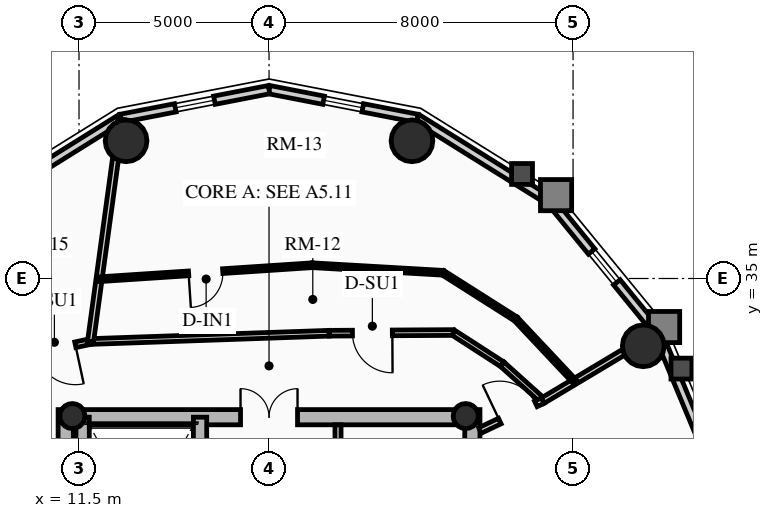
"""IFC4 building model, lengths in metres.
Left out: names, types, materials, properties, quantities, classifications, styles, units other than length and angle.
Written with IfcOpenShell. Run it as: python <this file> out.ifc"""

import sys

from ifc_helpers import new_model, si_unit, direction, frame, frame_2d, origin, origin_2d, place, context, subcontext, project, spatial, rectangle, circle, hollow_circle, extrude, source, transform, mapped, element, fill, save


model = new_model("IFC4")
c1 = context("Model", 3, precision=1e-05, world=origin(), true_north=direction((0.0, 1.0)))
c2 = subcontext(c1, "Body", "Model", "MODEL_VIEW")
j1 = project(units=[si_unit("LENGTHUNIT", "METRE"), si_unit("PLANEANGLEUNIT", "RADIAN")], contexts=[c1])
p1 = place(None, origin())
s1 = spatial("IfcSite", under=j1, at=p1, CompositionType="ELEMENT")
p2 = place(p1, origin())
s2 = spatial("IfcBuilding", under=s1, at=p2, CompositionType="ELEMENT")
p3 = place(p2, frame((0.0, 0.0, 219.94)))
s3 = spatial("IfcBuildingStorey", under=s2, at=p3, CompositionType="ELEMENT", Elevation=219.94)
for number, where, z_axis, x_axis in (
    (1, (11.15, 17.45, 0.0), (0.0, 0.0, 1.0), (0.0, 1.0, 0.0)),
    (2, (21.85, 17.45, 0.0), (0.0, 0.0, 1.0), (0.0, 1.0, 0.0)),
):
    element("IfcWall", number, at=place(p3, frame(where, z_axis=z_axis, x_axis=x_axis)), inside=s3, PredefinedType="SHEAR", context=c2, shape_type="SweptSolid", body=[
        extrude(rectangle(XDim=14.1, YDim=0.4, at=frame_2d((7.05, 0.0))), origin(), (0.0, 0.0, 1.0), 2.91),
    ])
p4 = place(p3, frame((11.15, 31.35, 0.0), z_axis=(0.0, 0.0, 1.0), x_axis=(1.0, 0.0, 0.0)))
e3 = element("IfcWall", 3, at=p4, inside=s3, PredefinedType="SHEAR", context=c2, shape_type="SweptSolid", body=[
    extrude(rectangle(XDim=10.7, YDim=0.4, at=frame_2d((5.35, 0.0))), origin(), (0.0, 0.0, 1.0), 2.91),
])
m1 = source(origin(), c2, "Body", "SweptSolid", [
    extrude(rectangle(XDim=1.5, YDim=2.02, at=frame_2d((0.75, 1.01))), frame((0.0, 0.21, 0.0), z_axis=(0.0, -1.0, 0.0), x_axis=(1.0, 0.0, 0.0)), (0.0, 0.0, 1.0), 0.42),
])
p5 = place(p4, frame((4.6, 0.0, 0.0)))
e4 = element("IfcOpeningElement", 4, at=p5, cuts=e3, PredefinedType="OPENING", context=c2, shape_type="MappedRepresentation", body=[
    mapped(m1, transform((0.0, 0.0, 0.0), x_axis=(1.0, 0.0, 0.0), y_axis=(0.0, 1.0, 0.0), z_axis=(0.0, 0.0, 1.0), scale=1.0)),
])
p6 = place(p3, frame((14.685, 17.65, 0.0), z_axis=(0.0, 0.0, 1.0), x_axis=(0.0, 1.0, 0.0)))
e5 = element("IfcWall", 5, at=p6, inside=s3, PredefinedType="SHEAR", context=c2, shape_type="SweptSolid", body=[
    extrude(rectangle(XDim=13.7, YDim=0.35, at=frame_2d((6.85, 0.0))), origin(), (0.0, 0.0, 1.0), 2.91),
])
m2 = source(origin(), c2, "Body", "SweptSolid", [
    extrude(rectangle(XDim=1.1, YDim=2.015, at=frame_2d((0.55, 1.007))), frame((0.0, 0.185, 0.0), z_axis=(0.0, -1.0, 0.0), x_axis=(1.0, 0.0, 0.0)), (0.0, 0.0, 1.0), 0.37),
])
p7 = place(p6, frame((4.85, 0.0, 0.0)))
e6 = element("IfcOpeningElement", 6, at=p7, cuts=e5, PredefinedType="OPENING", context=c2, shape_type="MappedRepresentation", body=[
    mapped(m2, transform((0.0, 0.0, 0.0), x_axis=(1.0, 0.0, 0.0), y_axis=(0.0, 1.0, 0.0), z_axis=(0.0, 0.0, 1.0), scale=1.0)),
])
p8 = place(p6, frame((0.625, 0.0, 0.0)))
e7 = element("IfcOpeningElement", 7, at=p8, cuts=e5, PredefinedType="OPENING", context=c2, shape_type="MappedRepresentation", body=[
    mapped(m2, transform((0.0, 0.0, 0.0), x_axis=(1.0, 0.0, 0.0), y_axis=(0.0, 1.0, 0.0), z_axis=(0.0, 0.0, 1.0), scale=1.0)),
])
p9 = place(p6, frame((2.625, 0.0, 0.0)))
e8 = element("IfcOpeningElement", 8, at=p9, cuts=e5, PredefinedType="OPENING", context=c2, shape_type="MappedRepresentation", body=[
    mapped(m2, transform((0.0, 0.0, 0.0), x_axis=(1.0, 0.0, 0.0), y_axis=(0.0, 1.0, 0.0), z_axis=(0.0, 0.0, 1.0), scale=1.0)),
])
m3 = source(origin(), c2, "Body", "SweptSolid", [
    extrude(rectangle(XDim=1.15, YDim=2.02, at=frame_2d((0.575, 1.01))), frame((0.0, 0.185, 0.0), z_axis=(0.0, -1.0, 0.0), x_axis=(1.0, 0.0, 0.0)), (0.0, 0.0, 1.0), 0.37),
])
p10 = place(p6, frame((7.27, 0.0, 0.0)))
e9 = element("IfcOpeningElement", 9, at=p10, cuts=e5, PredefinedType="OPENING", context=c2, shape_type="MappedRepresentation", body=[
    mapped(m3, transform((0.0, 0.0, 0.0), x_axis=(1.0, 0.0, 0.0), y_axis=(0.0, 1.0, 0.0), z_axis=(0.0, 0.0, 1.0), scale=1.0)),
])
p11 = place(p3, frame((11.595, 24.655, 0.0), z_axis=(0.0, 0.0, 1.0), x_axis=(0.0, 1.0, 0.0)))
e10 = element("IfcWall", 10, at=p11, inside=s3, PredefinedType="SHEAR", context=c2, shape_type="SweptSolid", body=[
    extrude(rectangle(XDim=6.695, YDim=0.35, at=frame_2d((3.348, 0.0))), origin(), (0.0, 0.0, 1.0), 2.91),
])
for number, where, z_axis, x_axis in (
    (11, (11.325, 31.38, 0.0), (0.0, 0.0, 1.0), (1.0, 0.0, 0.0)),
    (12, (21.675, 31.38, 0.0), (0.0, 0.0, 1.0), (1.0, 0.0, 0.0)),
):
    element("IfcColumn", number, at=place(p3, frame(where, z_axis=z_axis, x_axis=x_axis)), inside=s3, PredefinedType="COLUMN", context=c2, shape_type="SweptSolid", body=[
        extrude(hollow_circle(Radius=0.33, WallThickness=0.025, at=origin_2d()), origin(), (0.0, 0.0, 1.0), 2.91),
    ])
for number, where, z_axis, x_axis in (
    (13, (26.347, 33.229, 0.0), (0.0, 0.0, 1.0), (1.0, 0.0, 0.0)),
    (14, (20.261, 38.623, 0.0), (0.0, 0.0, 1.0), (1.0, 0.0, 0.0)),
    (15, (12.739, 38.623, 0.0), (0.0, 0.0, 1.0), (1.0, 0.0, 0.0)),
):
    element("IfcColumn", number, at=place(p3, frame(where, z_axis=z_axis, x_axis=x_axis)), inside=s3, PredefinedType="USERDEFINED", context=c2, shape_type="SweptSolid", body=[
        extrude(circle(Radius=0.55, at=origin_2d()), origin(), (0.0, 0.0, 1.0), 2.91),
    ])
p12 = place(p3, frame((26.718, 33.593, 0.0), z_axis=(0.0, 0.0, 1.0), x_axis=(0.384036305194, -0.923317993052, 0.0)))
e16 = element("IfcWall", 16, at=p12, inside=s3, PredefinedType="SOLIDWALL", context=c2, shape_type="SweptSolid", body=[
    extrude(rectangle(XDim=4.671, YDim=0.22, at=frame_2d((2.335, 0.0))), origin(), (0.0, 0.0, 1.0), 2.322),
])
p13 = place(p3, frame((23.924, 37.015, 0.0), z_axis=(0.0, 0.0, 1.0), x_axis=(0.632467166636, -0.774587169483, 0.0)))
e17 = element("IfcWall", 17, at=p13, inside=s3, PredefinedType="SOLIDWALL", context=c2, shape_type="SweptSolid", body=[
    extrude(rectangle(XDim=4.418, YDim=0.22, at=frame_2d((2.209, 0.0))), origin(), (0.0, 0.0, 1.0), 2.322),
])
m4 = source(origin(), c2, "Body", "SweptSolid", [
    extrude(rectangle(XDim=1.05, YDim=1.3, at=frame_2d((0.525, 0.65))), frame((0.0, 0.12, 0.0), z_axis=(0.0, -1.0, 0.0), x_axis=(1.0, 0.0, 0.0)), (0.0, 0.0, 1.0), 0.24),
])
p14 = place(p13, frame((1.684, 0.0, 0.65)))
e18 = element("IfcOpeningElement", 18, at=p14, cuts=e17, PredefinedType="OPENING", context=c2, shape_type="MappedRepresentation", body=[
    mapped(m4, transform((0.0, 0.0, 0.0), x_axis=(1.0, 0.0, 0.0), y_axis=(0.0, 1.0, 0.0), z_axis=(0.0, 0.0, 1.0), scale=1.0)),
])
p15 = place(p3, frame((20.403, 39.213, 0.0), z_axis=(0.0, 0.0, 1.0), x_axis=(0.848318713376, -0.529485939886, 0.0)))
e19 = element("IfcWall", 19, at=p15, inside=s3, PredefinedType="SOLIDWALL", context=c2, shape_type="SweptSolid", body=[
    extrude(rectangle(XDim=4.15, YDim=0.22, at=frame_2d((2.075, 0.0))), origin(), (0.0, 0.0, 1.0), 2.322),
])
p16 = place(p3, frame((16.5, 39.97, 0.0), z_axis=(0.0, 0.0, 1.0), x_axis=(0.981700307484, -0.190432419211, 0.0)))
e20 = element("IfcWall", 20, at=p16, inside=s3, PredefinedType="SOLIDWALL", context=c2, shape_type="SweptSolid", body=[
    extrude(rectangle(XDim=3.976, YDim=0.22, at=frame_2d((1.988, 0.0))), origin(), (0.0, 0.0, 1.0), 2.322),
])
p17 = place(p16, frame((1.463, 0.0, 0.65)))
e21 = element("IfcOpeningElement", 21, at=p17, cuts=e20, PredefinedType="OPENING", context=c2, shape_type="MappedRepresentation", body=[
    mapped(m4, transform((0.0, 0.0, 0.0), x_axis=(1.0, 0.0, 0.0), y_axis=(0.0, 1.0, 0.0), z_axis=(0.0, 0.0, 1.0), scale=1.0)),
])
p18 = place(p3, frame((12.597, 39.213, 0.0), z_axis=(0.0, 0.0, 1.0), x_axis=(0.981700307484, 0.190432419211, 0.0)))
e22 = element("IfcWall", 22, at=p18, inside=s3, PredefinedType="SOLIDWALL", context=c2, shape_type="SweptSolid", body=[
    extrude(rectangle(XDim=3.976, YDim=0.22, at=frame_2d((1.988, 0.0))), origin(), (0.0, 0.0, 1.0), 2.322),
])
p19 = place(p18, frame((1.463, 0.0, 0.65)))
e23 = element("IfcOpeningElement", 23, at=p19, cuts=e22, PredefinedType="OPENING", context=c2, shape_type="MappedRepresentation", body=[
    mapped(m4, transform((0.0, 0.0, 0.0), x_axis=(1.0, 0.0, 0.0), y_axis=(0.0, 1.0, 0.0), z_axis=(0.0, 0.0, 1.0), scale=1.0)),
])
p20 = place(p3, frame((9.076, 37.015, 0.0), z_axis=(0.0, 0.0, 1.0), x_axis=(0.848318713376, 0.529485939886, 0.0)))
e24 = element("IfcWall", 24, at=p20, inside=s3, PredefinedType="SOLIDWALL", context=c2, shape_type="SweptSolid", body=[
    extrude(rectangle(XDim=4.15, YDim=0.22, at=frame_2d((2.075, 0.0))), origin(), (0.0, 0.0, 1.0), 2.322),
])
p21 = place(p3, frame((18.315, 27.25, 0.0), z_axis=(0.0, 0.0, 1.0), x_axis=(0.0, 1.0, 0.0)))
e25 = element("IfcWall", 25, at=p21, inside=s3, PredefinedType="PARTITIONING", context=c2, shape_type="SweptSolid", body=[
    extrude(rectangle(XDim=3.9, YDim=0.16, at=frame_2d((1.95, 0.0))), origin(), (0.0, 0.0, 1.0), 2.685),
])
m5 = source(origin(), c2, "Body", "SweptSolid", [
    extrude(rectangle(XDim=0.9, YDim=2.005, at=frame_2d((0.45, 1.002))), frame((0.0, 0.09, 0.0), z_axis=(0.0, -1.0, 0.0), x_axis=(1.0, 0.0, 0.0)), (0.0, 0.0, 1.0), 0.18),
])
p22 = place(p21, frame((0.55, 0.0, 0.0)))
e26 = element("IfcOpeningElement", 26, at=p22, cuts=e25, PredefinedType="OPENING", context=c2, shape_type="MappedRepresentation", body=[
    mapped(m5, transform((0.0, 0.0, 0.0), x_axis=(1.0, 0.0, 0.0), y_axis=(0.0, 1.0, 0.0), z_axis=(0.0, 0.0, 1.0), scale=1.0)),
])
p23 = place(p21, frame((2.35, 0.0, 0.0)))
e27 = element("IfcOpeningElement", 27, at=p23, cuts=e25, PredefinedType="OPENING", context=c2, shape_type="MappedRepresentation", body=[
    mapped(m5, transform((0.0, 0.0, 0.0), x_axis=(1.0, 0.0, 0.0), y_axis=(0.0, 1.0, 0.0), z_axis=(0.0, 0.0, 1.0), scale=1.0)),
])
p24 = place(p3, frame((23.701, 31.786, 0.0), z_axis=(0.0, 0.0, 1.0), x_axis=(-0.743742806382, 0.668465883913, 0.0)))
e28 = element("IfcWall", 28, at=p24, inside=s3, PredefinedType="PARTITIONING", context=c2, shape_type="SweptSolid", body=[
    extrude(rectangle(XDim=1.434, YDim=0.15, at=frame_2d((0.717, 0.0))), origin(), (0.0, 0.0, 1.0), 2.322),
])
p25 = place(p3, frame((22.635, 32.744, 0.0), z_axis=(0.0, 0.0, 1.0), x_axis=(-0.840119270642, 0.542401706391, 0.0)))
e29 = element("IfcWall", 29, at=p25, inside=s3, PredefinedType="PARTITIONING", context=c2, shape_type="SweptSolid", body=[
    extrude(rectangle(XDim=1.538, YDim=0.15, at=frame_2d((0.769, 0.0))), origin(), (0.0, 0.0, 1.0), 2.255),
])
p26 = place(p3, frame((21.344, 33.578, 0.0), z_axis=(0.0, 0.0, 1.0), x_axis=(-0.999984243152, -0.005613684, 0.0)))
e30 = element("IfcWall", 30, at=p26, inside=s3, PredefinedType="PARTITIONING", context=c2, shape_type="SweptSolid", body=[
    extrude(rectangle(XDim=3.262, YDim=0.15, at=frame_2d((1.631, 0.0))), origin(), (0.0, 0.0, 1.0), 2.322),
])
m6 = source(origin(), c2, "Body", "SweptSolid", [
    extrude(rectangle(XDim=1.05, YDim=2.015, at=frame_2d((0.525, 1.007))), frame((0.0, 0.085, 0.0), z_axis=(0.0, -1.0, 0.0), x_axis=(1.0, 0.0, 0.0)), (0.0, 0.0, 1.0), 0.17),
])
p27 = place(p26, frame((1.599, 0.0, 0.0)))
e31 = element("IfcOpeningElement", 31, at=p27, cuts=e30, PredefinedType="OPENING", context=c2, shape_type="MappedRepresentation", body=[
    mapped(m6, transform((0.0, 0.0, 0.0), x_axis=(1.0, 0.0, 0.0), y_axis=(0.0, 1.0, 0.0), z_axis=(0.0, 0.0, 1.0), scale=1.0)),
])
p28 = place(p3, frame((18.082, 33.56, 0.0), z_axis=(0.0, 0.0, 1.0), x_axis=(-0.999399009709, -0.034664382185, 0.0)))
e32 = element("IfcWall", 32, at=p28, inside=s3, PredefinedType="PARTITIONING", context=c2, shape_type="SweptSolid", body=[
    extrude(rectangle(XDim=6.282, YDim=0.15, at=frame_2d((3.141, 0.0))), origin(), (0.0, 0.0, 1.0), 2.255),
])
p29 = place(p3, frame((11.803, 33.342, 0.0), z_axis=(0.0, 0.0, 1.0), x_axis=(-0.977750742783, -0.209770076483, 0.0)))
e33 = element("IfcWall", 33, at=p29, inside=s3, PredefinedType="PARTITIONING", context=c2, shape_type="SweptSolid", body=[
    extrude(rectangle(XDim=1.868, YDim=0.15, at=frame_2d((0.934, 0.0))), origin(), (0.0, 0.0, 1.0), 2.255),
])
p30 = place(p29, frame((0.409, 0.0, 0.0)))
e34 = element("IfcOpeningElement", 34, at=p30, cuts=e33, PredefinedType="OPENING", context=c2, shape_type="MappedRepresentation", body=[
    mapped(m6, transform((0.0, 0.0, 0.0), x_axis=(1.0, 0.0, 0.0), y_axis=(0.0, 1.0, 0.0), z_axis=(0.0, 0.0, 1.0), scale=1.0)),
])
p31 = place(p3, frame((23.701, 31.786, 0.0), z_axis=(0.0, 0.0, 1.0), x_axis=(0.858059206709, 0.513550774298, 0.0)))
e35 = element("IfcWall", 35, at=p31, inside=s3, PredefinedType="PARTITIONING", context=c2, shape_type="SweptSolid", body=[
    extrude(rectangle(XDim=3.497, YDim=0.16, at=frame_2d((1.748, 0.0))), origin(), (0.0, 0.0, 1.0), 2.322),
])
p32 = place(p3, frame((11.803, 33.342, 0.0), z_axis=(0.0, 0.0, 1.0), x_axis=(0.135452591041, 0.990783828885, 0.0)))
e36 = element("IfcWall", 36, at=p32, inside=s3, PredefinedType="PARTITIONING", context=c2, shape_type="SweptSolid", body=[
    extrude(rectangle(XDim=5.906, YDim=0.16, at=frame_2d((2.953, 0.0))), origin(), (0.0, 0.0, 1.0), 2.322),
])
p33 = place(p3, frame((22.05, 31.0, 0.0), z_axis=(0.0, 0.0, 1.0), x_axis=(0.903013459407, 0.429612257891, 0.0)))
e37 = element("IfcWall", 37, at=p33, inside=s3, PredefinedType="PARTITIONING", context=c2, shape_type="SweptSolid", body=[
    extrude(rectangle(XDim=1.829, YDim=0.16, at=frame_2d((0.914, 0.0))), origin(), (0.0, 0.0, 1.0), 2.255),
])
m7 = source(origin(), c2, "Body", "SweptSolid", [
    extrude(rectangle(XDim=1.05, YDim=2.015, at=frame_2d((0.525, 1.007))), frame((0.0, 0.09, 0.0), z_axis=(0.0, -1.0, 0.0), x_axis=(1.0, 0.0, 0.0)), (0.0, 0.0, 1.0), 0.18),
])
p34 = place(p33, frame((0.579, 0.0, 0.0)))
e38 = element("IfcOpeningElement", 38, at=p34, cuts=e37, PredefinedType="OPENING", context=c2, shape_type="MappedRepresentation", body=[
    mapped(m7, transform((0.0, 0.0, 0.0), x_axis=(1.0, 0.0, 0.0), y_axis=(0.0, 1.0, 0.0), z_axis=(0.0, 0.0, 1.0), scale=1.0)),
])
p35 = place(p3, frame((24.542, 32.288, 0.0), z_axis=(0.0, 0.0, 1.0), x_axis=(-0.68501091047, 0.72853280814, 0.0)))
e39 = element("IfcWall", 39, at=p35, inside=s3, PredefinedType="PARTITIONING", context=c2, shape_type="SweptSolid", body=[
    extrude(rectangle(XDim=2.261, YDim=0.125, at=frame_2d((1.13, 0.0))), origin(), (0.0, 0.0, 1.0), 2.322),
])
p36 = place(p3, frame((22.993, 33.935, 0.0), z_axis=(0.0, 0.0, 1.0), x_axis=(-0.844312558894, 0.535851008112, 0.0)))
e40 = element("IfcWall", 40, at=p36, inside=s3, PredefinedType="PARTITIONING", context=c2, shape_type="SweptSolid", body=[
    extrude(rectangle(XDim=2.268, YDim=0.125, at=frame_2d((1.134, 0.0))), origin(), (0.0, 0.0, 1.0), 2.255),
])
p37 = place(p3, frame((21.078, 35.15, 0.0), z_axis=(0.0, 0.0, 1.0), x_axis=(-0.99833900121, 0.057612834184, 0.0)))
e41 = element("IfcWall", 41, at=p37, inside=s3, PredefinedType="PARTITIONING", context=c2, shape_type="SweptSolid", body=[
    extrude(rectangle(XDim=3.445, YDim=0.125, at=frame_2d((1.723, 0.0))), origin(), (0.0, 0.0, 1.0), 2.322),
])
p38 = place(p3, frame((17.639, 35.349, 0.0), z_axis=(0.0, 0.0, 1.0), x_axis=(-0.997849042159, -0.065553711275, 0.0)))
e42 = element("IfcWall", 42, at=p38, inside=s3, PredefinedType="PARTITIONING", context=c2, shape_type="SweptSolid", body=[
    extrude(rectangle(XDim=5.624, YDim=0.125, at=frame_2d((2.812, 0.0))), origin(), (0.0, 0.0, 1.0), 2.255),
])
m8 = source(origin(), c2, "Body", "SweptSolid", [
    extrude(rectangle(XDim=0.9, YDim=2.005, at=frame_2d((0.45, 1.002))), frame((0.0, 0.073, 0.0), z_axis=(0.0, -1.0, 0.0), x_axis=(1.0, 0.0, 0.0)), (0.0, 0.0, 1.0), 0.145),
])
p39 = place(p38, frame((2.362, 0.0, 0.0)))
e43 = element("IfcOpeningElement", 43, at=p39, cuts=e42, PredefinedType="OPENING", context=c2, shape_type="MappedRepresentation", body=[
    mapped(m8, transform((0.0, 0.0, 0.0), x_axis=(1.0, 0.0, 0.0), y_axis=(0.0, 1.0, 0.0), z_axis=(0.0, 0.0, 1.0), scale=1.0)),
])
m9 = source(origin(), c2, "Body", "SweptSolid", [
    extrude(rectangle(XDim=1.05, YDim=1.3, at=frame_2d((0.525, 0.65))), frame((0.0, 0.03, 0.0), z_axis=(0.0, -1.0, 0.0), x_axis=(1.0, 0.0, 0.0)), (0.0, 0.0, 1.0), 0.06),
])
p40 = place(p14, origin())
e44 = element("IfcWindow", 44, at=p40, inside=s3, PartitioningType="SINGLE_PANEL", PredefinedType="WINDOW", context=c2, shape_type="MappedRepresentation", body=[
    mapped(m9, transform((0.0, 0.0, 0.0), x_axis=(1.0, 0.0, 0.0), y_axis=(0.0, 1.0, 0.0), z_axis=(0.0, 0.0, 1.0), scale=1.0)),
])
fill(e18, e44)
p41 = place(p17, origin())
e45 = element("IfcWindow", 45, at=p41, inside=s3, PartitioningType="SINGLE_PANEL", PredefinedType="WINDOW", context=c2, shape_type="MappedRepresentation", body=[
    mapped(m9, transform((0.0, 0.0, 0.0), x_axis=(1.0, 0.0, 0.0), y_axis=(0.0, 1.0, 0.0), z_axis=(0.0, 0.0, 1.0), scale=1.0)),
])
fill(e21, e45)
p42 = place(p19, origin())
e46 = element("IfcWindow", 46, at=p42, inside=s3, PartitioningType="SINGLE_PANEL", PredefinedType="WINDOW", context=c2, shape_type="MappedRepresentation", body=[
    mapped(m9, transform((0.0, 0.0, 0.0), x_axis=(1.0, 0.0, 0.0), y_axis=(0.0, 1.0, 0.0), z_axis=(0.0, 0.0, 1.0), scale=1.0)),
])
fill(e23, e46)
m10 = source(origin(), c2, "Body", "SweptSolid", [
    extrude(rectangle(XDim=1.5, YDim=2.02, at=frame_2d((0.75, 1.01))), frame((0.0, 0.025, 0.0), z_axis=(0.0, -1.0, 0.0), x_axis=(1.0, 0.0, 0.0)), (0.0, 0.0, 1.0), 0.05),
])
p43 = place(p5, origin())
e47 = element("IfcDoor", 47, at=p43, inside=s3, OperationType="DOUBLE_DOOR_SINGLE_SWING", PredefinedType="DOOR", context=c2, shape_type="MappedRepresentation", body=[
    mapped(m10, transform((0.0, 0.0, 0.0), x_axis=(1.0, 0.0, 0.0), y_axis=(0.0, 1.0, 0.0), z_axis=(0.0, 0.0, 1.0), scale=1.0)),
])
fill(e4, e47)
m11 = source(origin(), c2, "Body", "SweptSolid", [
    extrude(rectangle(XDim=1.05, YDim=2.015, at=frame_2d((0.525, 1.007))), frame((0.0, 0.025, 0.0), z_axis=(0.0, -1.0, 0.0), x_axis=(1.0, 0.0, 0.0)), (0.0, 0.0, 1.0), 0.05),
])
p44 = place(p34, origin())
e48 = element("IfcDoor", 48, at=p44, inside=s3, OperationType="SINGLE_SWING_LEFT", PredefinedType="DOOR", context=c2, shape_type="MappedRepresentation", body=[
    mapped(m11, transform((0.0, 0.0, 0.0), x_axis=(1.0, 0.0, 0.0), y_axis=(0.0, 1.0, 0.0), z_axis=(0.0, 0.0, 1.0), scale=1.0)),
])
fill(e38, e48)
p45 = place(p27, origin())
e49 = element("IfcDoor", 49, at=p45, inside=s3, OperationType="SINGLE_SWING_LEFT", PredefinedType="DOOR", context=c2, shape_type="MappedRepresentation", body=[
    mapped(m11, transform((0.0, 0.0, 0.0), x_axis=(1.0, 0.0, 0.0), y_axis=(0.0, 1.0, 0.0), z_axis=(0.0, 0.0, 1.0), scale=1.0)),
])
fill(e31, e49)
m12 = source(origin(), c2, "Body", "SweptSolid", [
    extrude(rectangle(XDim=0.9, YDim=2.005, at=frame_2d((0.45, 1.002))), frame((0.0, 0.025, 0.0), z_axis=(0.0, -1.0, 0.0), x_axis=(1.0, 0.0, 0.0)), (0.0, 0.0, 1.0), 0.05),
])
p46 = place(p39, origin())
e50 = element("IfcDoor", 50, at=p46, inside=s3, OperationType="SINGLE_SWING_RIGHT", PredefinedType="DOOR", context=c2, shape_type="MappedRepresentation", body=[
    mapped(m12, transform((0.0, 0.0, 0.0), x_axis=(1.0, 0.0, 0.0), y_axis=(0.0, 1.0, 0.0), z_axis=(0.0, 0.0, 1.0), scale=1.0)),
])
fill(e43, e50)
p47 = place(p30, origin())
e51 = element("IfcDoor", 51, at=p47, inside=s3, OperationType="SINGLE_SWING_LEFT", PredefinedType="DOOR", context=c2, shape_type="MappedRepresentation", body=[
    mapped(m11, transform((0.0, 0.0, 0.0), x_axis=(1.0, 0.0, 0.0), y_axis=(0.0, 1.0, 0.0), z_axis=(0.0, 0.0, 1.0), scale=1.0)),
])
fill(e34, e51)
save(model, sys.argv[1])
